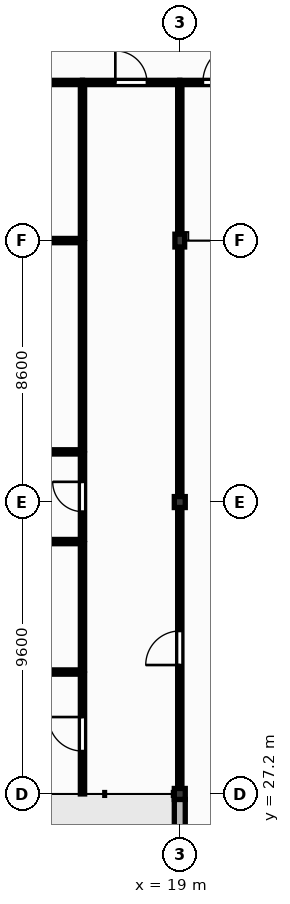
"""IFC4 building model, lengths in metres.
Left out: names, types, materials, properties, quantities, classifications, styles, units other than length and angle.
Written with IfcOpenShell. Run it as: python <this file> out.ifc"""

import sys

from ifc_helpers import new_model, si_unit, direction, frame, frame_2d, origin, origin_2d, place, context, subcontext, project, spatial, rectangle, extrude, element, fill, save


model = new_model("IFC4")
c1 = context("Model", 3, precision=1e-05, world=origin(), true_north=direction((0.0, 1.0)))
c2 = subcontext(c1, "Body", "Model", "MODEL_VIEW")
j1 = project(units=[si_unit("LENGTHUNIT", "METRE"), si_unit("PLANEANGLEUNIT", "RADIAN")], contexts=[c1])
p1 = place(None, origin())
s1 = spatial("IfcSite", under=j1, at=p1, CompositionType="ELEMENT")
p2 = place(p1, origin())
s2 = spatial("IfcBuilding", under=s1, at=p2, CompositionType="ELEMENT")
p3 = place(p2, frame((0.0, 0.0, 4.5)))
s3 = spatial("IfcBuildingStorey", under=s2, at=p3, CompositionType="ELEMENT", Elevation=4.5)
for number, where, z_axis, x_axis in (
    (1, (19.0, 27.2, 0.0), (0.0, 0.0, 1.0), (1.0, 0.0, 0.0)),
    (2, (19.0, 36.8, 0.0), (0.0, 0.0, 1.0), (1.0, 0.0, 0.0)),
):
    element("IfcColumn", number, at=place(p3, frame(where, z_axis=z_axis, x_axis=x_axis)), inside=s3, PredefinedType="COLUMN", context=c2, shape_type="SweptSolid", body=[
        extrude(rectangle(XDim=0.36, YDim=0.36, at=origin_2d()), origin(), (0.0, 0.0, 1.0), 4.26),
    ])
p4 = place(p3, frame((19.0, 45.4, 0.0), z_axis=(0.0, 0.0, 1.0), x_axis=(1.0, 0.0, 0.0)))
e3 = element("IfcColumn", 3, at=p4, inside=s3, PredefinedType="COLUMN", context=c2, shape_type="SweptSolid", body=[
    extrude(rectangle(XDim=0.32, YDim=0.42, at=origin_2d()), origin(), (0.0, 0.0, 1.0), 4.26),
])
p5 = place(p3, frame((19.0, 18.78, 0.0), z_axis=(0.0, 0.0, 1.0), x_axis=(0.0, 1.0, 0.0)))
e4 = element("IfcWall", 4, at=p5, inside=s3, PredefinedType="SOLIDWALL", context=c2, shape_type="SweptSolid", body=[
    extrude(rectangle(XDim=8.24, YDim=0.36, at=frame_2d((4.12, 0.0))), origin(), (0.0, 0.0, 1.0), 3.8),
])
p6 = place(p5, frame((3.37, 0.0, 0.0)))
e5 = element("IfcOpeningElement", 5, at=p6, cuts=e4, PredefinedType="OPENING", context=c2, shape_type="SweptSolid", body=[
    extrude(rectangle(XDim=1.5, YDim=2.3, at=frame_2d((0.75, 1.15))), frame((0.0, 0.19, 0.0), z_axis=(0.0, -1.0, 0.0), x_axis=(1.0, 0.0, 0.0)), (0.0, 0.0, 1.0), 0.38),
])
p7 = place(p5, frame((0.975, 0.0, 1.0)))
e6 = element("IfcOpeningElement", 6, at=p7, cuts=e4, PredefinedType="OPENING", context=c2, shape_type="SweptSolid", body=[
    extrude(rectangle(XDim=1.48, YDim=2.2, at=frame_2d((0.74, 1.1))), frame((0.0, 0.19, 0.0), z_axis=(0.0, -1.0, 0.0), x_axis=(1.0, 0.0, 0.0)), (0.0, 0.0, 1.0), 0.38),
])
p8 = place(p5, frame((5.725, 0.0, 1.0)))
e7 = element("IfcOpeningElement", 7, at=p8, cuts=e4, PredefinedType="OPENING", context=c2, shape_type="SweptSolid", body=[
    extrude(rectangle(XDim=1.6, YDim=2.2, at=frame_2d((0.8, 1.1))), frame((0.0, 0.19, 0.0), z_axis=(0.0, -1.0, 0.0), x_axis=(1.0, 0.0, 0.0)), (0.0, 0.0, 1.0), 0.38),
])
p9 = place(p3, frame((11.8, 31.209, 0.0), z_axis=(0.0, 0.0, 1.0), x_axis=(1.0, 0.0, 0.0)))
e8 = element("IfcWall", 8, at=p9, inside=s3, PredefinedType="PARTITIONING", context=c2, shape_type="SweptSolid", body=[
    extrude(rectangle(XDim=4.0, YDim=0.14, at=frame_2d((2.0, 0.0))), origin(), (0.0, 0.0, 1.0), 4.18),
])
p10 = place(p3, frame((11.8, 35.5, 0.0), z_axis=(0.0, 0.0, 1.0), x_axis=(1.0, 0.0, 0.0)))
e9 = element("IfcWall", 9, at=p10, inside=s3, PredefinedType="PARTITIONING", context=c2, shape_type="SweptSolid", body=[
    extrude(rectangle(XDim=4.0, YDim=0.14, at=frame_2d((2.0, 0.0))), origin(), (0.0, 0.0, 1.0), 4.18),
])
p11 = place(p10, frame((1.54, 0.0, 0.0)))
e10 = element("IfcOpeningElement", 10, at=p11, cuts=e9, PredefinedType="OPENING", context=c2, shape_type="SweptSolid", body=[
    extrude(rectangle(XDim=0.92, YDim=2.1, at=frame_2d((0.46, 1.05))), frame((0.0, 0.08, 0.0), z_axis=(0.0, -1.0, 0.0), x_axis=(1.0, 0.0, 0.0)), (0.0, 0.0, 1.0), 0.16),
])
p12 = place(p3, frame((11.8, 38.45, 0.0), z_axis=(0.0, 0.0, 1.0), x_axis=(1.0, 0.0, 0.0)))
e11 = element("IfcWall", 11, at=p12, inside=s3, PredefinedType="PARTITIONING", context=c2, shape_type="SweptSolid", body=[
    extrude(rectangle(XDim=4.0, YDim=0.14, at=frame_2d((2.0, 0.0))), origin(), (0.0, 0.0, 1.0), 4.18),
])
p13 = place(p12, frame((1.42, 0.0, 0.0)))
e12 = element("IfcOpeningElement", 12, at=p13, cuts=e11, PredefinedType="OPENING", context=c2, shape_type="SweptSolid", body=[
    extrude(rectangle(XDim=1.16, YDim=2.1, at=frame_2d((0.58, 1.05))), frame((0.0, 0.08, 0.0), z_axis=(0.0, -1.0, 0.0), x_axis=(1.0, 0.0, 0.0)), (0.0, 0.0, 1.0), 0.16),
])
p14 = place(p3, frame((11.98, 45.4, 0.0), z_axis=(0.0, 0.0, 1.0), x_axis=(1.0, 0.0, 0.0)))
e13 = element("IfcWall", 13, at=p14, inside=s3, PredefinedType="PARTITIONING", context=c2, shape_type="SweptSolid", body=[
    extrude(rectangle(XDim=3.82, YDim=0.14, at=frame_2d((1.91, 0.0))), origin(), (0.0, 0.0, 1.0), 3.62),
])
p15 = place(p3, frame((11.8, 50.6, 0.0), z_axis=(0.0, 0.0, 1.0), x_axis=(1.0, 0.0, 0.0)))
e14 = element("IfcWall", 14, at=p15, inside=s3, PredefinedType="PARTITIONING", context=c2, shape_type="SweptSolid", body=[
    extrude(rectangle(XDim=4.0, YDim=0.14, at=frame_2d((2.0, 0.0))), origin(), (0.0, 0.0, 1.0), 4.18),
])
p16 = place(p15, frame((1.1, 0.0, 0.0)))
e15 = element("IfcOpeningElement", 15, at=p16, cuts=e14, PredefinedType="OPENING", context=c2, shape_type="SweptSolid", body=[
    extrude(rectangle(XDim=1.8, YDim=2.3, at=frame_2d((0.9, 1.15))), frame((0.0, 0.08, 0.0), z_axis=(0.0, -1.0, 0.0), x_axis=(1.0, 0.0, 0.0)), (0.0, 0.0, 1.0), 0.16),
])
p17 = place(p3, frame((15.8, 27.2, 0.0), z_axis=(0.0, 0.0, 1.0), x_axis=(0.0, 1.0, 0.0)))
e16 = element("IfcWall", 16, at=p17, inside=s3, PredefinedType="PARTITIONING", context=c2, shape_type="SweptSolid", body=[
    extrude(rectangle(XDim=3.939, YDim=0.14, at=frame_2d((1.969, 0.0))), origin(), (0.0, 0.0, 1.0), 4.18),
])
p18 = place(p17, frame((1.409, 0.0, 0.0)))
e17 = element("IfcOpeningElement", 17, at=p18, cuts=e16, PredefinedType="OPENING", context=c2, shape_type="SweptSolid", body=[
    extrude(rectangle(XDim=1.12, YDim=2.15, at=frame_2d((0.56, 1.075))), frame((0.0, 0.08, 0.0), z_axis=(0.0, -1.0, 0.0), x_axis=(1.0, 0.0, 0.0)), (0.0, 0.0, 1.0), 0.16),
])
p19 = place(p3, frame((15.8, 31.279, 0.0), z_axis=(0.0, 0.0, 1.0), x_axis=(0.0, 1.0, 0.0)))
e18 = element("IfcWall", 18, at=p19, inside=s3, PredefinedType="PARTITIONING", context=c2, shape_type="SweptSolid", body=[
    extrude(rectangle(XDim=4.151, YDim=0.14, at=frame_2d((2.075, 0.0))), origin(), (0.0, 0.0, 1.0), 4.18),
])
p20 = place(p3, frame((15.8, 35.57, 0.0), z_axis=(0.0, 0.0, 1.0), x_axis=(0.0, 1.0, 0.0)))
e19 = element("IfcWall", 19, at=p20, inside=s3, PredefinedType="PARTITIONING", context=c2, shape_type="SweptSolid", body=[
    extrude(rectangle(XDim=2.81, YDim=0.14, at=frame_2d((1.405, 0.0))), origin(), (0.0, 0.0, 1.0), 4.18),
])
p21 = place(p20, frame((0.915, 0.0, 0.0)))
e20 = element("IfcOpeningElement", 20, at=p21, cuts=e19, PredefinedType="OPENING", context=c2, shape_type="SweptSolid", body=[
    extrude(rectangle(XDim=0.98, YDim=2.15, at=frame_2d((0.49, 1.075))), frame((0.0, 0.08, 0.0), z_axis=(0.0, -1.0, 0.0), x_axis=(1.0, 0.0, 0.0)), (0.0, 0.0, 1.0), 0.16),
])
p22 = place(p3, frame((15.8, 38.52, 0.0), z_axis=(0.0, 0.0, 1.0), x_axis=(0.0, 1.0, 0.0)))
e21 = element("IfcWall", 21, at=p22, inside=s3, PredefinedType="PARTITIONING", context=c2, shape_type="SweptSolid", body=[
    extrude(rectangle(XDim=6.81, YDim=0.14, at=frame_2d((3.405, 0.0))), origin(), (0.0, 0.0, 1.0), 4.18),
])
p23 = place(p3, frame((15.8, 45.47, 0.0), z_axis=(0.0, 0.0, 1.0), x_axis=(0.0, 1.0, 0.0)))
e22 = element("IfcWall", 22, at=p23, inside=s3, PredefinedType="PARTITIONING", context=c2, shape_type="SweptSolid", body=[
    extrude(rectangle(XDim=5.06, YDim=0.14, at=frame_2d((2.53, 0.0))), origin(), (0.0, 0.0, 1.0), 4.18),
])
p24 = place(p3, frame((15.8, 50.6, 0.0), z_axis=(0.0, 0.0, 1.0), x_axis=(1.0, 0.0, 0.0)))
e23 = element("IfcWall", 23, at=p24, inside=s3, PredefinedType="PARTITIONING", context=c2, shape_type="SweptSolid", body=[
    extrude(rectangle(XDim=3.2, YDim=0.14, at=frame_2d((1.6, 0.0))), origin(), (0.0, 0.0, 1.0), 4.18),
])
p25 = place(p24, frame((1.08, 0.0, 0.0)))
e24 = element("IfcOpeningElement", 24, at=p25, cuts=e23, PredefinedType="OPENING", context=c2, shape_type="SweptSolid", body=[
    extrude(rectangle(XDim=1.04, YDim=2.1, at=frame_2d((0.52, 1.05))), frame((0.0, 0.08, 0.0), z_axis=(0.0, -1.0, 0.0), x_axis=(1.0, 0.0, 0.0)), (0.0, 0.0, 1.0), 0.16),
])
p26 = place(p3, frame((19.0, 27.38, 0.0), z_axis=(0.0, 0.0, 1.0), x_axis=(0.0, 1.0, 0.0)))
e25 = element("IfcWall", 25, at=p26, inside=s3, PredefinedType="PARTITIONING", context=c2, shape_type="SweptSolid", body=[
    extrude(rectangle(XDim=9.24, YDim=0.14, at=frame_2d((4.62, 0.0))), origin(), (0.0, 0.0, 1.0), 3.62),
])
p27 = place(p26, frame((4.06, 0.0, 0.0)))
e26 = element("IfcOpeningElement", 26, at=p27, cuts=e25, PredefinedType="OPENING", context=c2, shape_type="SweptSolid", body=[
    extrude(rectangle(XDim=1.12, YDim=2.15, at=frame_2d((0.56, 1.075))), frame((0.0, 0.08, 0.0), z_axis=(0.0, -1.0, 0.0), x_axis=(1.0, 0.0, 0.0)), (0.0, 0.0, 1.0), 0.16),
])
p28 = place(p3, frame((19.0, 36.98, 0.0), z_axis=(0.0, 0.0, 1.0), x_axis=(0.0, 1.0, 0.0)))
e27 = element("IfcWall", 27, at=p28, inside=s3, PredefinedType="PARTITIONING", context=c2, shape_type="SweptSolid", body=[
    extrude(rectangle(XDim=8.21, YDim=0.14, at=frame_2d((4.105, 0.0))), origin(), (0.0, 0.0, 1.0), 3.62),
])
p29 = place(p3, frame((19.0, 45.61, 0.0), z_axis=(0.0, 0.0, 1.0), x_axis=(0.0, 1.0, 0.0)))
e28 = element("IfcWall", 28, at=p29, inside=s3, PredefinedType="PARTITIONING", context=c2, shape_type="SweptSolid", body=[
    extrude(rectangle(XDim=4.92, YDim=0.14, at=frame_2d((2.46, 0.0))), origin(), (0.0, 0.0, 1.0), 3.74),
])
p30 = place(p3, frame((19.0, 50.6, 0.0), z_axis=(0.0, 0.0, 1.0), x_axis=(1.0, 0.0, 0.0)))
e29 = element("IfcWall", 29, at=p30, inside=s3, PredefinedType="PARTITIONING", context=c2, shape_type="SweptSolid", body=[
    extrude(rectangle(XDim=2.8, YDim=0.14, at=frame_2d((1.4, 0.0))), origin(), (0.0, 0.0, 1.0), 4.18),
])
p31 = place(p30, frame((0.76, 0.0, 0.0)))
e30 = element("IfcOpeningElement", 30, at=p31, cuts=e29, PredefinedType="OPENING", context=c2, shape_type="SweptSolid", body=[
    extrude(rectangle(XDim=1.28, YDim=2.2, at=frame_2d((0.64, 1.1))), frame((0.0, 0.08, 0.0), z_axis=(0.0, -1.0, 0.0), x_axis=(1.0, 0.0, 0.0)), (0.0, 0.0, 1.0), 0.16),
])
p32 = place(p25, origin())
e31 = element("IfcDoor", 31, at=p32, inside=s3, OperationType="SINGLE_SWING_LEFT", PredefinedType="DOOR", context=c2, shape_type="SweptSolid", body=[
    extrude(rectangle(XDim=1.04, YDim=2.1, at=frame_2d((0.52, 1.05))), frame((0.0, 0.025, 0.0), z_axis=(0.0, -1.0, 0.0), x_axis=(1.0, 0.0, 0.0)), (0.0, 0.0, 1.0), 0.05),
])
fill(e24, e31)
p33 = place(p31, origin())
e32 = element("IfcDoor", 32, at=p33, inside=s3, OperationType="SINGLE_SWING_RIGHT", PredefinedType="DOOR", context=c2, shape_type="SweptSolid", body=[
    extrude(rectangle(XDim=1.28, YDim=2.2, at=frame_2d((0.64, 1.1))), frame((0.0, 0.025, 0.0), z_axis=(0.0, -1.0, 0.0), x_axis=(1.0, 0.0, 0.0)), (0.0, 0.0, 1.0), 0.05),
])
fill(e30, e32)
p34 = place(p21, origin())
e33 = element("IfcDoor", 33, at=p34, inside=s3, OperationType="SINGLE_SWING_RIGHT", PredefinedType="DOOR", context=c2, shape_type="SweptSolid", body=[
    extrude(rectangle(XDim=0.98, YDim=2.15, at=frame_2d((0.49, 1.075))), frame((0.0, 0.025, 0.0), z_axis=(0.0, -1.0, 0.0), x_axis=(1.0, 0.0, 0.0)), (0.0, 0.0, 1.0), 0.05),
])
fill(e20, e33)
p35 = place(p27, origin())
e34 = element("IfcDoor", 34, at=p35, inside=s3, OperationType="SINGLE_SWING_LEFT", PredefinedType="DOOR", context=c2, shape_type="SweptSolid", body=[
    extrude(rectangle(XDim=1.12, YDim=2.15, at=frame_2d((0.56, 1.075))), frame((0.0, 0.025, 0.0), z_axis=(0.0, -1.0, 0.0), x_axis=(1.0, 0.0, 0.0)), (0.0, 0.0, 1.0), 0.05),
])
fill(e26, e34)
p36 = place(p18, origin())
e35 = element("IfcDoor", 35, at=p36, inside=s3, OperationType="SINGLE_SWING_RIGHT", PredefinedType="DOOR", context=c2, shape_type="SweptSolid", body=[
    extrude(rectangle(XDim=1.12, YDim=2.15, at=frame_2d((0.56, 1.075))), frame((0.0, 0.025, 0.0), z_axis=(0.0, -1.0, 0.0), x_axis=(1.0, 0.0, 0.0)), (0.0, 0.0, 1.0), 0.05),
])
fill(e17, e35)
save(model, sys.argv[1])
